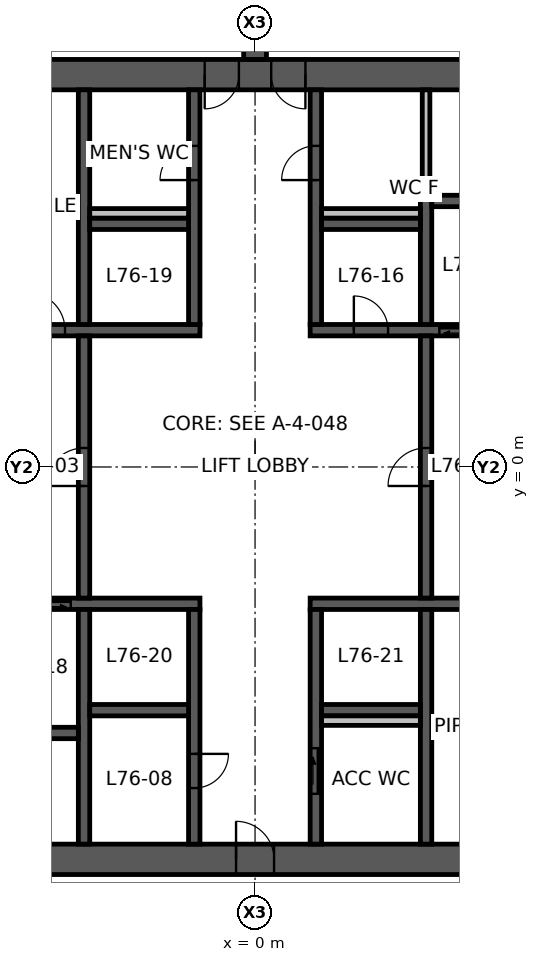
"""IFC4 building model, lengths in metres.
Left out: names, types, materials, properties, quantities, classifications, styles, units other than length and angle.
Written with IfcOpenShell. Run it as: python <this file> out.ifc"""

import sys

from ifc_helpers import new_model, si_unit, direction, frame, frame_2d, origin, place, context, subcontext, project, spatial, polyline, rectangle, outline, extrude, element, fill, save


model = new_model("IFC4")
c1 = context("Model", 3, precision=1e-05, world=origin(), true_north=direction((0.0, 1.0)))
c2 = subcontext(c1, "Body", "Model", "MODEL_VIEW")
j1 = project(units=[si_unit("LENGTHUNIT", "METRE"), si_unit("PLANEANGLEUNIT", "RADIAN")], contexts=[c1])
p1 = place(None, origin())
s1 = spatial("IfcSite", under=j1, at=p1, CompositionType="ELEMENT")
p2 = place(p1, origin())
s2 = spatial("IfcBuilding", under=s1, at=p2, CompositionType="ELEMENT")
p3 = place(p2, frame((0.0, 0.0, 302.5)))
s3 = spatial("IfcBuildingStorey", under=s2, at=p3, CompositionType="ELEMENT", Elevation=302.5)
p4 = place(p3, frame((5.961, 10.325, 0.0), z_axis=(0.0, 0.0, 1.0), x_axis=(-1.0, 0.0, 0.0)))
e1 = element("IfcWall", 1, at=p4, inside=s3, PredefinedType="SHEAR", context=c2, shape_type="SweptSolid", body=[
    extrude(outline(polyline([(-0.231, -0.4), (4.636, -0.4), (5.536, -0.4), (6.386, -0.4), (7.286, -0.4), (12.153, -0.4), (11.691, 0.4), (7.286, 0.4), (6.386, 0.4), (5.536, 0.4), (4.636, 0.4), (0.231, 0.4), (-0.231, -0.4)])), origin(), (0.0, 0.0, 1.0), 5.0),
])
p5 = place(p4, frame((6.386, 0.0, 0.0)))
e2 = element("IfcOpeningElement", 2, at=p5, cuts=e1, PredefinedType="OPENING", context=c2, shape_type="SweptSolid", body=[
    extrude(rectangle(XDim=0.9, YDim=2.1, at=frame_2d((0.45, 1.05))), frame((0.0, 0.41, 0.0), z_axis=(0.0, -1.0, 0.0), x_axis=(1.0, 0.0, 0.0)), (0.0, 0.0, 1.0), 0.82),
])
p6 = place(p4, frame((4.636, 0.0, 0.0)))
e3 = element("IfcOpeningElement", 3, at=p6, cuts=e1, PredefinedType="OPENING", context=c2, shape_type="SweptSolid", body=[
    extrude(rectangle(XDim=0.9, YDim=2.1, at=frame_2d((0.45, 1.05))), frame((0.0, 0.41, 0.0), z_axis=(0.0, -1.0, 0.0), x_axis=(1.0, 0.0, 0.0)), (0.0, 0.0, 1.0), 0.82),
])
p7 = place(p3, frame((-5.961, -10.325, 0.0), z_axis=(0.0, 0.0, 1.0), x_axis=(1.0, 0.0, 0.0)))
e4 = element("IfcWall", 4, at=p7, inside=s3, PredefinedType="SHEAR", context=c2, shape_type="SweptSolid", body=[
    extrude(outline(polyline([(-0.231, -0.4), (5.461, -0.4), (6.461, -0.4), (12.153, -0.4), (11.691, 0.4), (6.461, 0.4), (5.461, 0.4), (0.231, 0.4), (-0.231, -0.4)])), origin(), (0.0, 0.0, 1.0), 5.0),
])
p8 = place(p7, frame((5.461, 0.0, 0.0)))
e5 = element("IfcOpeningElement", 5, at=p8, cuts=e4, PredefinedType="OPENING", context=c2, shape_type="SweptSolid", body=[
    extrude(rectangle(XDim=1.0, YDim=2.1, at=frame_2d((0.5, 1.05))), frame((0.0, 0.41, 0.0), z_axis=(0.0, -1.0, 0.0), x_axis=(1.0, 0.0, 0.0)), (0.0, 0.0, 1.0), 0.82),
])
p9 = place(p3, frame((0.0, 10.725, 0.0), z_axis=(0.0, 0.0, 1.0), x_axis=(0.0, 1.0, 0.0)))
e6 = element("IfcWall", 6, at=p9, inside=s3, PredefinedType="SHEAR", context=c2, shape_type="SweptSolid", body=[
    extrude(rectangle(XDim=7.045, YDim=0.6, at=frame_2d((3.523, 0.0))), origin(), (0.0, 0.0, 1.0), 5.0),
])
p10 = place(p9, frame((1.0, 0.0, 0.0)))
e7 = element("IfcOpeningElement", 7, at=p10, cuts=e6, PredefinedType="OPENING", context=c2, shape_type="SweptSolid", body=[
    extrude(rectangle(XDim=1.0, YDim=2.1, at=frame_2d((0.5, 1.05))), frame((0.0, 0.31, 0.0), z_axis=(0.0, -1.0, 0.0), x_axis=(1.0, 0.0, 0.0)), (0.0, 0.0, 1.0), 0.62),
])
p11 = place(p3, frame((-9.382, 3.6, 0.0), z_axis=(0.0, 0.0, 1.0), x_axis=(1.0, 0.0, 0.0)))
e8 = element("IfcWall", 8, at=p11, inside=s3, PredefinedType="SHEAR", context=c2, shape_type="SweptSolid", body=[
    extrude(outline(polyline([(-0.087, -0.15), (3.382, -0.15), (4.382, -0.15), (7.932, -0.15), (7.932, 0.15), (4.382, 0.15), (3.382, 0.15), (0.087, 0.15), (-0.087, -0.15)])), origin(), (0.0, 0.0, 1.0), 5.0),
])
p12 = place(p11, frame((3.382, 0.0, 0.0)))
e9 = element("IfcOpeningElement", 9, at=p12, cuts=e8, PredefinedType="OPENING", context=c2, shape_type="SweptSolid", body=[
    extrude(rectangle(XDim=1.0, YDim=2.1, at=frame_2d((0.5, 1.05))), frame((0.0, 0.16, 0.0), z_axis=(0.0, -1.0, 0.0), x_axis=(1.0, 0.0, 0.0)), (0.0, 0.0, 1.0), 0.32),
])
p13 = place(p3, frame((1.45, 3.6, 0.0), z_axis=(0.0, 0.0, 1.0), x_axis=(1.0, 0.0, 0.0)))
e10 = element("IfcWall", 10, at=p13, inside=s3, PredefinedType="SHEAR", context=c2, shape_type="SweptSolid", body=[
    extrude(outline(polyline([(0.0, -0.15), (1.15, -0.15), (2.05, -0.15), (3.4, -0.15), (4.7, -0.15), (8.019, -0.15), (7.845, 0.15), (4.7, 0.15), (3.4, 0.15), (2.05, 0.15), (1.15, 0.15), (0.0, 0.15), (0.0, -0.15)])), origin(), (0.0, 0.0, 1.0), 5.0),
])
p14 = place(p13, frame((1.15, 0.0, 0.0)))
e11 = element("IfcOpeningElement", 11, at=p14, cuts=e10, PredefinedType="OPENING", context=c2, shape_type="SweptSolid", body=[
    extrude(rectangle(XDim=0.9, YDim=2.1, at=frame_2d((0.45, 1.05))), frame((0.0, 0.16, 0.0), z_axis=(0.0, -1.0, 0.0), x_axis=(1.0, 0.0, 0.0)), (0.0, 0.0, 1.0), 0.32),
])
p15 = place(p13, frame((3.4, 0.0, 0.0)))
e12 = element("IfcOpeningElement", 12, at=p15, cuts=e10, PredefinedType="OPENING", context=c2, shape_type="SweptSolid", body=[
    extrude(rectangle(XDim=1.3, YDim=2.1, at=frame_2d((0.65, 1.05))), frame((0.0, 0.16, 0.0), z_axis=(0.0, -1.0, 0.0), x_axis=(1.0, 0.0, 0.0)), (0.0, 0.0, 1.0), 0.32),
])
p16 = place(p3, frame((-9.382, -3.6, 0.0), z_axis=(0.0, 0.0, 1.0), x_axis=(1.0, 0.0, 0.0)))
e13 = element("IfcWall", 13, at=p16, inside=s3, PredefinedType="SHEAR", context=c2, shape_type="SweptSolid", body=[
    extrude(outline(polyline([(0.087, -0.15), (3.232, -0.15), (4.532, -0.15), (7.932, -0.15), (7.932, 0.15), (4.532, 0.15), (3.232, 0.15), (-0.087, 0.15), (0.087, -0.15)])), origin(), (0.0, 0.0, 1.0), 5.0),
])
p17 = place(p16, frame((3.232, 0.0, 0.0)))
e14 = element("IfcOpeningElement", 14, at=p17, cuts=e13, PredefinedType="OPENING", context=c2, shape_type="SweptSolid", body=[
    extrude(rectangle(XDim=1.3, YDim=2.1, at=frame_2d((0.65, 1.05))), frame((0.0, 0.16, 0.0), z_axis=(0.0, -1.0, 0.0), x_axis=(1.0, 0.0, 0.0)), (0.0, 0.0, 1.0), 0.32),
])
p18 = place(p3, frame((1.45, -3.6, 0.0), z_axis=(0.0, 0.0, 1.0), x_axis=(1.0, 0.0, 0.0)))
e15 = element("IfcWall", 15, at=p18, inside=s3, PredefinedType="SHEAR", context=c2, shape_type="SweptSolid", body=[
    extrude(outline(polyline([(0.0, -0.15), (7.845, -0.15), (8.019, 0.15), (0.0, 0.15), (0.0, -0.15)])), origin(), (0.0, 0.0, 1.0), 5.0),
])
p19 = place(p3, frame((-1.6, 3.75, 0.0), z_axis=(0.0, 0.0, 1.0), x_axis=(0.0, 1.0, 0.0)))
e16 = element("IfcWall", 16, at=p19, inside=s3, PredefinedType="SHEAR", context=c2, shape_type="SweptSolid", body=[
    extrude(rectangle(XDim=6.175, YDim=0.3, at=frame_2d((3.087, 0.0))), origin(), (0.0, 0.0, 1.0), 5.0),
])
p20 = place(p19, frame((3.8, 0.0, 0.0)))
e17 = element("IfcOpeningElement", 17, at=p20, cuts=e16, PredefinedType="OPENING", context=c2, shape_type="SweptSolid", body=[
    extrude(rectangle(XDim=0.9, YDim=2.1, at=frame_2d((0.45, 1.05))), frame((0.0, 0.16, 0.0), z_axis=(0.0, -1.0, 0.0), x_axis=(1.0, 0.0, 0.0)), (0.0, 0.0, 1.0), 0.32),
])
p21 = place(p3, frame((1.6, 3.75, 0.0), z_axis=(0.0, 0.0, 1.0), x_axis=(0.0, 1.0, 0.0)))
e18 = element("IfcWall", 18, at=p21, inside=s3, PredefinedType="SHEAR", context=c2, shape_type="SweptSolid", body=[
    extrude(rectangle(XDim=6.175, YDim=0.3, at=frame_2d((3.087, 0.0))), origin(), (0.0, 0.0, 1.0), 5.0),
])
p22 = place(p21, frame((3.8, 0.0, 0.0)))
e19 = element("IfcOpeningElement", 19, at=p22, cuts=e18, PredefinedType="OPENING", context=c2, shape_type="SweptSolid", body=[
    extrude(rectangle(XDim=0.9, YDim=2.1, at=frame_2d((0.45, 1.05))), frame((0.0, 0.16, 0.0), z_axis=(0.0, -1.0, 0.0), x_axis=(1.0, 0.0, 0.0)), (0.0, 0.0, 1.0), 0.32),
])
p23 = place(p3, frame((-1.6, -3.75, 0.0), z_axis=(0.0, 0.0, 1.0), x_axis=(0.0, -1.0, 0.0)))
e20 = element("IfcWall", 20, at=p23, inside=s3, PredefinedType="SHEAR", context=c2, shape_type="SweptSolid", body=[
    extrude(rectangle(XDim=6.175, YDim=0.3, at=frame_2d((3.087, 0.0))), origin(), (0.0, 0.0, 1.0), 5.0),
])
p24 = place(p23, frame((3.8, 0.0, 0.0)))
e21 = element("IfcOpeningElement", 21, at=p24, cuts=e20, PredefinedType="OPENING", context=c2, shape_type="SweptSolid", body=[
    extrude(rectangle(XDim=0.9, YDim=2.1, at=frame_2d((0.45, 1.05))), frame((0.0, 0.16, 0.0), z_axis=(0.0, -1.0, 0.0), x_axis=(1.0, 0.0, 0.0)), (0.0, 0.0, 1.0), 0.32),
])
p25 = place(p3, frame((1.6, -3.75, 0.0), z_axis=(0.0, 0.0, 1.0), x_axis=(0.0, -1.0, 0.0)))
e22 = element("IfcWall", 22, at=p25, inside=s3, PredefinedType="SHEAR", context=c2, shape_type="SweptSolid", body=[
    extrude(rectangle(XDim=6.175, YDim=0.3, at=frame_2d((3.087, 0.0))), origin(), (0.0, 0.0, 1.0), 5.0),
])
p26 = place(p25, frame((3.65, 0.0, 0.0)))
e23 = element("IfcOpeningElement", 23, at=p26, cuts=e22, PredefinedType="OPENING", context=c2, shape_type="SweptSolid", body=[
    extrude(rectangle(XDim=1.2, YDim=2.1, at=frame_2d((0.6, 1.05))), frame((0.0, 0.16, 0.0), z_axis=(0.0, -1.0, 0.0), x_axis=(1.0, 0.0, 0.0)), (0.0, 0.0, 1.0), 0.32),
])
p27 = place(p3, frame((-4.5, -3.45, 0.0), z_axis=(0.0, 0.0, 1.0), x_axis=(0.0, 1.0, 0.0)))
e24 = element("IfcWall", 24, at=p27, inside=s3, PredefinedType="SHEAR", context=c2, shape_type="SweptSolid", body=[
    extrude(rectangle(XDim=6.9, YDim=0.3, at=frame_2d((3.45, 0.0))), origin(), (0.0, 0.0, 1.0), 5.0),
])
p28 = place(p27, frame((2.95, 0.0, 0.0)))
e25 = element("IfcOpeningElement", 25, at=p28, cuts=e24, PredefinedType="OPENING", context=c2, shape_type="SweptSolid", body=[
    extrude(rectangle(XDim=1.0, YDim=2.1, at=frame_2d((0.5, 1.05))), frame((0.0, 0.16, 0.0), z_axis=(0.0, -1.0, 0.0), x_axis=(1.0, 0.0, 0.0)), (0.0, 0.0, 1.0), 0.32),
])
p29 = place(p3, frame((4.5, -3.45, 0.0), z_axis=(0.0, 0.0, 1.0), x_axis=(0.0, 1.0, 0.0)))
e26 = element("IfcWall", 26, at=p29, inside=s3, PredefinedType="SHEAR", context=c2, shape_type="SweptSolid", body=[
    extrude(rectangle(XDim=6.9, YDim=0.3, at=frame_2d((3.45, 0.0))), origin(), (0.0, 0.0, 1.0), 5.0),
])
p30 = place(p29, frame((2.95, 0.0, 0.0)))
e27 = element("IfcOpeningElement", 27, at=p30, cuts=e26, PredefinedType="OPENING", context=c2, shape_type="SweptSolid", body=[
    extrude(rectangle(XDim=1.0, YDim=2.1, at=frame_2d((0.5, 1.05))), frame((0.0, 0.16, 0.0), z_axis=(0.0, -1.0, 0.0), x_axis=(1.0, 0.0, 0.0)), (0.0, 0.0, 1.0), 0.32),
])
p31 = place(p3, frame((-4.5, 3.75, 0.0), z_axis=(0.0, 0.0, 1.0), x_axis=(0.0, 1.0, 0.0)))
e28 = element("IfcWall", 28, at=p31, inside=s3, PredefinedType="SHEAR", context=c2, shape_type="SweptSolid", body=[
    extrude(rectangle(XDim=6.175, YDim=0.3, at=frame_2d((3.087, 0.0))), origin(), (0.0, 0.0, 1.0), 5.0),
])
p32 = place(p3, frame((4.5, 3.75, 0.0), z_axis=(0.0, 0.0, 1.0), x_axis=(0.0, 1.0, 0.0)))
e29 = element("IfcWall", 29, at=p32, inside=s3, PredefinedType="SHEAR", context=c2, shape_type="SweptSolid", body=[
    extrude(rectangle(XDim=3.4, YDim=0.3, at=frame_2d((1.7, 0.0))), origin(), (0.0, 0.0, 1.0), 5.0),
])
for number, where, z_axis, x_axis in (
    (30, (-4.5, -3.75, 0.0), (0.0, 0.0, 1.0), (0.0, -1.0, 0.0)),
    (31, (4.5, -3.75, 0.0), (0.0, 0.0, 1.0), (0.0, -1.0, 0.0)),
):
    element("IfcWall", number, at=place(p3, frame(where, z_axis=z_axis, x_axis=x_axis)), inside=s3, PredefinedType="SHEAR", context=c2, shape_type="SweptSolid", body=[
        extrude(rectangle(XDim=6.175, YDim=0.3, at=frame_2d((3.087, 0.0))), origin(), (0.0, 0.0, 1.0), 5.0),
    ])
for number, where, z_axis, x_axis in (
    (32, (-4.35, 6.4, 0.0), (0.0, 0.0, 1.0), (1.0, 0.0, 0.0)),
    (33, (1.75, 6.4, 0.0), (0.0, 0.0, 1.0), (1.0, 0.0, 0.0)),
    (34, (-4.35, -6.4, 0.0), (0.0, 0.0, 1.0), (1.0, 0.0, 0.0)),
    (35, (1.75, -6.4, 0.0), (0.0, 0.0, 1.0), (1.0, 0.0, 0.0)),
    (36, (-7.25, -7.0, 0.0), (0.0, 0.0, 1.0), (1.0, 0.0, 0.0)),
    (37, (4.65, 7.0, 0.0), (0.0, 0.0, 1.0), (1.0, 0.0, 0.0)),
):
    element("IfcWall", number, at=place(p3, frame(where, z_axis=z_axis, x_axis=x_axis)), inside=s3, PredefinedType="SHEAR", context=c2, shape_type="SweptSolid", body=[
        extrude(rectangle(XDim=2.6, YDim=0.3, at=frame_2d((1.3, 0.0))), origin(), (0.0, 0.0, 1.0), 5.0),
    ])
p33 = place(p3, frame((4.5, 7.15, 0.0), z_axis=(0.0, 0.0, 1.0), x_axis=(0.0, 1.0, 0.0)))
e38 = element("IfcWall", 38, at=p33, inside=s3, PredefinedType="STANDARD", context=c2, shape_type="SweptSolid", body=[
    extrude(rectangle(XDim=2.775, YDim=0.2, at=frame_2d((1.388, 0.0))), origin(), (0.0, 0.0, 1.0), 5.0),
])
for number, where, z_axis, x_axis in (
    (39, (-4.35, 6.675, 0.0), (0.0, 0.0, 1.0), (1.0, 0.0, 0.0)),
    (40, (1.75, 6.675, 0.0), (0.0, 0.0, 1.0), (1.0, 0.0, 0.0)),
    (41, (1.75, -6.675, 0.0), (0.0, 0.0, 1.0), (1.0, 0.0, 0.0)),
):
    element("IfcWall", number, at=place(p3, frame(where, z_axis=z_axis, x_axis=x_axis)), inside=s3, PredefinedType="PLUMBINGWALL", context=c2, shape_type="SweptSolid", body=[
        extrude(rectangle(XDim=2.6, YDim=0.25, at=frame_2d((1.3, 0.0))), origin(), (0.0, 0.0, 1.0), 5.0),
    ])
p34 = place(p5, origin())
e42 = element("IfcDoor", 42, at=p34, inside=s3, OperationType="SINGLE_SWING_RIGHT", PredefinedType="DOOR", context=c2, shape_type="SweptSolid", body=[
    extrude(rectangle(XDim=0.9, YDim=2.1, at=frame_2d((0.45, 1.05))), frame((0.0, 0.025, 0.0), z_axis=(0.0, -1.0, 0.0), x_axis=(1.0, 0.0, 0.0)), (0.0, 0.0, 1.0), 0.05),
])
fill(e2, e42)
p35 = place(p6, origin())
e43 = element("IfcDoor", 43, at=p35, inside=s3, OperationType="SINGLE_SWING_LEFT", PredefinedType="DOOR", context=c2, shape_type="SweptSolid", body=[
    extrude(rectangle(XDim=0.9, YDim=2.1, at=frame_2d((0.45, 1.05))), frame((0.0, 0.025, 0.0), z_axis=(0.0, -1.0, 0.0), x_axis=(1.0, 0.0, 0.0)), (0.0, 0.0, 1.0), 0.05),
])
fill(e3, e43)
p36 = place(p8, origin())
e44 = element("IfcDoor", 44, at=p36, inside=s3, OperationType="SINGLE_SWING_LEFT", PredefinedType="DOOR", context=c2, shape_type="SweptSolid", body=[
    extrude(rectangle(XDim=1.0, YDim=2.1, at=frame_2d((0.5, 1.05))), frame((0.0, 0.025, 0.0), z_axis=(0.0, -1.0, 0.0), x_axis=(1.0, 0.0, 0.0)), (0.0, 0.0, 1.0), 0.05),
])
fill(e5, e44)
p37 = place(p30, origin())
e45 = element("IfcDoor", 45, at=p37, inside=s3, OperationType="SINGLE_SWING_LEFT", PredefinedType="DOOR", context=c2, shape_type="SweptSolid", body=[
    extrude(rectangle(XDim=1.0, YDim=2.1, at=frame_2d((0.5, 1.05))), frame((0.0, 0.025, 0.0), z_axis=(0.0, -1.0, 0.0), x_axis=(1.0, 0.0, 0.0)), (0.0, 0.0, 1.0), 0.05),
])
fill(e27, e45)
p38 = place(p28, origin())
e46 = element("IfcDoor", 46, at=p38, inside=s3, OperationType="SINGLE_SWING_LEFT", PredefinedType="DOOR", context=c2, shape_type="SweptSolid", body=[
    extrude(rectangle(XDim=1.0, YDim=2.1, at=frame_2d((0.5, 1.05))), frame((0.0, 0.025, 0.0), z_axis=(0.0, -1.0, 0.0), x_axis=(1.0, 0.0, 0.0)), (0.0, 0.0, 1.0), 0.05),
])
fill(e25, e46)
p39 = place(p12, origin())
e47 = element("IfcDoor", 47, at=p39, inside=s3, OperationType="SINGLE_SWING_LEFT", PredefinedType="DOOR", context=c2, shape_type="SweptSolid", body=[
    extrude(rectangle(XDim=1.0, YDim=2.1, at=frame_2d((0.5, 1.05))), frame((0.0, 0.025, 0.0), z_axis=(0.0, -1.0, 0.0), x_axis=(1.0, 0.0, 0.0)), (0.0, 0.0, 1.0), 0.05),
])
fill(e9, e47)
p40 = place(p20, origin())
e48 = element("IfcDoor", 48, at=p40, inside=s3, OperationType="SINGLE_SWING_LEFT", PredefinedType="DOOR", context=c2, shape_type="SweptSolid", body=[
    extrude(rectangle(XDim=0.9, YDim=2.1, at=frame_2d((0.45, 1.05))), frame((0.0, 0.025, 0.0), z_axis=(0.0, -1.0, 0.0), x_axis=(1.0, 0.0, 0.0)), (0.0, 0.0, 1.0), 0.05),
])
fill(e17, e48)
p41 = place(p22, origin())
e49 = element("IfcDoor", 49, at=p41, inside=s3, OperationType="SINGLE_SWING_LEFT", PredefinedType="DOOR", context=c2, shape_type="SweptSolid", body=[
    extrude(rectangle(XDim=0.9, YDim=2.1, at=frame_2d((0.45, 1.05))), frame((0.0, 0.025, 0.0), z_axis=(0.0, -1.0, 0.0), x_axis=(1.0, 0.0, 0.0)), (0.0, 0.0, 1.0), 0.05),
])
fill(e19, e49)
p42 = place(p26, origin())
e50 = element("IfcDoor", 50, at=p42, inside=s3, OperationType="SLIDING_TO_LEFT", PredefinedType="DOOR", context=c2, shape_type="SweptSolid", body=[
    extrude(rectangle(XDim=1.2, YDim=2.1, at=frame_2d((0.6, 1.05))), frame((0.0, 0.025, 0.0), z_axis=(0.0, -1.0, 0.0), x_axis=(1.0, 0.0, 0.0)), (0.0, 0.0, 1.0), 0.05),
])
fill(e23, e50)
p43 = place(p24, origin())
e51 = element("IfcDoor", 51, at=p43, inside=s3, OperationType="SINGLE_SWING_LEFT", PredefinedType="DOOR", context=c2, shape_type="SweptSolid", body=[
    extrude(rectangle(XDim=0.9, YDim=2.1, at=frame_2d((0.45, 1.05))), frame((0.0, 0.025, 0.0), z_axis=(0.0, -1.0, 0.0), x_axis=(1.0, 0.0, 0.0)), (0.0, 0.0, 1.0), 0.05),
])
fill(e21, e51)
p44 = place(p14, origin())
e52 = element("IfcDoor", 52, at=p44, inside=s3, OperationType="SINGLE_SWING_LEFT", PredefinedType="DOOR", context=c2, shape_type="SweptSolid", body=[
    extrude(rectangle(XDim=0.9, YDim=2.1, at=frame_2d((0.45, 1.05))), frame((0.0, 0.025, 0.0), z_axis=(0.0, -1.0, 0.0), x_axis=(1.0, 0.0, 0.0)), (0.0, 0.0, 1.0), 0.05),
])
fill(e11, e52)
p45 = place(p15, origin())
e53 = element("IfcDoor", 53, at=p45, inside=s3, OperationType="DOUBLE_DOOR_SLIDING", PredefinedType="DOOR", context=c2, shape_type="SweptSolid", body=[
    extrude(rectangle(XDim=1.3, YDim=2.1, at=frame_2d((0.65, 1.05))), frame((0.0, 0.025, 0.0), z_axis=(0.0, -1.0, 0.0), x_axis=(1.0, 0.0, 0.0)), (0.0, 0.0, 1.0), 0.05),
])
fill(e12, e53)
p46 = place(p17, origin())
e54 = element("IfcDoor", 54, at=p46, inside=s3, OperationType="DOUBLE_DOOR_SLIDING", PredefinedType="DOOR", context=c2, shape_type="SweptSolid", body=[
    extrude(rectangle(XDim=1.3, YDim=2.1, at=frame_2d((0.65, 1.05))), frame((0.0, 0.025, 0.0), z_axis=(0.0, -1.0, 0.0), x_axis=(1.0, 0.0, 0.0)), (0.0, 0.0, 1.0), 0.05),
])
fill(e14, e54)
save(model, sys.argv[1])
